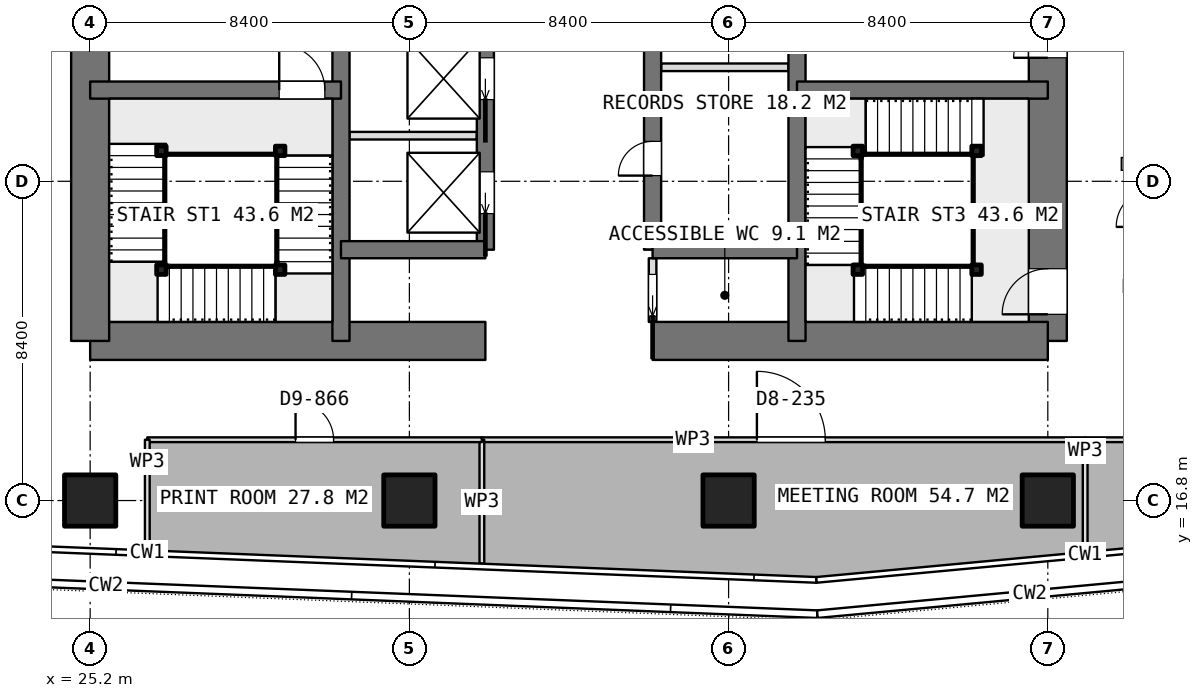
"""IFC4 building model, lengths in metres.
Left out: names, types, materials, properties, quantities, classifications, styles, units other than length and angle.
Written with IfcOpenShell. Run it as: python <this file> out.ifc"""

import sys

from ifc_helpers import new_model, si_unit, direction, frame, frame_2d, origin, origin_2d, place, context, subcontext, project, spatial, rectangle, extrude, element, fill, save


model = new_model("IFC4")
c1 = context("Model", 3, precision=1e-05, world=origin(), true_north=direction((0.0, 1.0)))
c2 = subcontext(c1, "Body", "Model", "MODEL_VIEW")
j1 = project(units=[si_unit("LENGTHUNIT", "METRE"), si_unit("PLANEANGLEUNIT", "RADIAN")], contexts=[c1])
p1 = place(None, origin())
s1 = spatial("IfcSite", under=j1, at=p1, CompositionType="ELEMENT")
p2 = place(p1, origin())
s2 = spatial("IfcBuilding", under=s1, at=p2, CompositionType="ELEMENT")
p3 = place(p2, frame((0.0, 0.0, 217.7)))
s3 = spatial("IfcBuildingStorey", under=s2, at=p3, CompositionType="ELEMENT", Elevation=217.7)
p4 = place(p3, frame((25.2, 21.0, 0.0), z_axis=(0.0, 0.0, 1.0), x_axis=(1.0, 0.0, 0.0)))
e1 = element("IfcWall", 1, at=p4, inside=s3, PredefinedType="SHEAR", context=c2, shape_type="SweptSolid", body=[
    extrude(rectangle(XDim=10.4, YDim=1.0, at=frame_2d((5.2, 0.0))), origin(), (0.0, 0.0, 1.0), 3.75),
])
p5 = place(p3, frame((40.0, 21.0, 0.0), z_axis=(0.0, 0.0, 1.0), x_axis=(1.0, 0.0, 0.0)))
e2 = element("IfcWall", 2, at=p5, inside=s3, PredefinedType="SHEAR", context=c2, shape_type="SweptSolid", body=[
    extrude(rectangle(XDim=10.4, YDim=1.0, at=frame_2d((5.2, 0.0))), origin(), (0.0, 0.0, 1.0), 3.75),
])
p6 = place(p3, frame((25.2, 21.0, 0.0), z_axis=(0.0, 0.0, 1.0), x_axis=(0.0, 1.0, 0.0)))
e3 = element("IfcWall", 3, at=p6, inside=s3, PredefinedType="SHEAR", context=c2, shape_type="SweptSolid", body=[
    extrude(rectangle(XDim=25.2, YDim=1.0, at=frame_2d((12.6, 0.0))), origin(), (0.0, 0.0, 1.0), 3.75),
])
p7 = place(p6, frame((7.8, 0.0, 0.0)))
e4 = element("IfcOpeningElement", 4, at=p7, cuts=e3, PredefinedType="OPENING", context=c2, shape_type="SweptSolid", body=[
    extrude(rectangle(XDim=1.2, YDim=2.1, at=frame_2d((0.6, 1.05))), frame((0.0, 0.51, 0.0), z_axis=(0.0, -1.0, 0.0), x_axis=(1.0, 0.0, 0.0)), (0.0, 0.0, 1.0), 1.02),
])
p8 = place(p6, frame((14.25, 0.0, 0.0)))
e5 = element("IfcOpeningElement", 5, at=p8, cuts=e3, PredefinedType="OPENING", context=c2, shape_type="SweptSolid", body=[
    extrude(rectangle(XDim=0.9, YDim=2.1, at=frame_2d((0.45, 1.05))), frame((0.0, 0.51, 0.0), z_axis=(0.0, -1.0, 0.0), x_axis=(1.0, 0.0, 0.0)), (0.0, 0.0, 1.0), 1.02),
])
p9 = place(p6, frame((16.85, 0.0, 0.0)))
e6 = element("IfcOpeningElement", 6, at=p9, cuts=e3, PredefinedType="OPENING", context=c2, shape_type="SweptSolid", body=[
    extrude(rectangle(XDim=0.9, YDim=2.1, at=frame_2d((0.45, 1.05))), frame((0.0, 0.51, 0.0), z_axis=(0.0, -1.0, 0.0), x_axis=(1.0, 0.0, 0.0)), (0.0, 0.0, 1.0), 1.02),
])
p10 = place(p6, frame((19.025, 0.0, 0.0)))
e7 = element("IfcOpeningElement", 7, at=p10, cuts=e3, PredefinedType="OPENING", context=c2, shape_type="SweptSolid", body=[
    extrude(rectangle(XDim=1.2, YDim=2.1, at=frame_2d((0.6, 1.05))), frame((0.0, 0.51, 0.0), z_axis=(0.0, -1.0, 0.0), x_axis=(1.0, 0.0, 0.0)), (0.0, 0.0, 1.0), 1.02),
])
p11 = place(p3, frame((50.4, 21.0, 0.0), z_axis=(0.0, 0.0, 1.0), x_axis=(0.0, 1.0, 0.0)))
e8 = element("IfcWall", 8, at=p11, inside=s3, PredefinedType="SHEAR", context=c2, shape_type="SweptSolid", body=[
    extrude(rectangle(XDim=25.2, YDim=1.0, at=frame_2d((12.6, 0.0))), origin(), (0.0, 0.0, 1.0), 3.75),
])
p12 = place(p11, frame((16.2, 0.0, 0.0)))
e9 = element("IfcOpeningElement", 9, at=p12, cuts=e8, PredefinedType="OPENING", context=c2, shape_type="SweptSolid", body=[
    extrude(rectangle(XDim=1.2, YDim=2.1, at=frame_2d((0.6, 1.05))), frame((0.0, 0.51, 0.0), z_axis=(0.0, -1.0, 0.0), x_axis=(1.0, 0.0, 0.0)), (0.0, 0.0, 1.0), 1.02),
])
p13 = place(p11, frame((10.05, 0.0, 0.0)))
e10 = element("IfcOpeningElement", 10, at=p13, cuts=e8, PredefinedType="OPENING", context=c2, shape_type="SweptSolid", body=[
    extrude(rectangle(XDim=0.9, YDim=2.1, at=frame_2d((0.45, 1.05))), frame((0.0, 0.51, 0.0), z_axis=(0.0, -1.0, 0.0), x_axis=(1.0, 0.0, 0.0)), (0.0, 0.0, 1.0), 1.02),
])
p14 = place(p11, frame((7.45, 0.0, 0.0)))
e11 = element("IfcOpeningElement", 11, at=p14, cuts=e8, PredefinedType="OPENING", context=c2, shape_type="SweptSolid", body=[
    extrude(rectangle(XDim=0.9, YDim=2.1, at=frame_2d((0.45, 1.05))), frame((0.0, 0.51, 0.0), z_axis=(0.0, -1.0, 0.0), x_axis=(1.0, 0.0, 0.0)), (0.0, 0.0, 1.0), 1.02),
])
p15 = place(p11, frame((0.7, 0.0, 0.0)))
e12 = element("IfcOpeningElement", 12, at=p15, cuts=e8, PredefinedType="OPENING", context=c2, shape_type="SweptSolid", body=[
    extrude(rectangle(XDim=1.2, YDim=2.1, at=frame_2d((0.6, 1.05))), frame((0.0, 0.51, 0.0), z_axis=(0.0, -1.0, 0.0), x_axis=(1.0, 0.0, 0.0)), (0.0, 0.0, 1.0), 1.02),
])
for number, where, z_axis, x_axis in (
    (13, (31.8, 21.0, 0.0), (0.0, 0.0, 1.0), (0.0, 1.0, 0.0)),
    (14, (43.8, 21.0, 0.0), (0.0, 0.0, 1.0), (0.0, 1.0, 0.0)),
):
    element("IfcWall", number, at=place(p3, frame(where, z_axis=z_axis, x_axis=x_axis)), inside=s3, PredefinedType="SHEAR", context=c2, shape_type="SweptSolid", body=[
        extrude(rectangle(XDim=25.2, YDim=0.45, at=frame_2d((12.6, 0.0))), origin(), (0.0, 0.0, 1.0), 3.75),
    ])
p16 = place(p3, frame((35.6, 23.4, 0.0), z_axis=(0.0, 0.0, 1.0), x_axis=(0.0, 1.0, 0.0)))
e15 = element("IfcWall", 15, at=p16, inside=s3, PredefinedType="SHEAR", context=c2, shape_type="SweptSolid", body=[
    extrude(rectangle(XDim=18.0, YDim=0.45, at=frame_2d((9.0, 0.0))), origin(), (0.0, 0.0, 1.0), 3.75),
])
p17 = place(p16, frame((0.95, 0.0, 0.0)))
e16 = element("IfcOpeningElement", 16, at=p17, cuts=e15, PredefinedType="OPENING", context=c2, shape_type="SweptSolid", body=[
    extrude(rectangle(XDim=1.1, YDim=2.1, at=frame_2d((0.55, 1.05))), frame((0.0, 0.235, 0.0), z_axis=(0.0, -1.0, 0.0), x_axis=(1.0, 0.0, 0.0)), (0.0, 0.0, 1.0), 0.47),
])
p18 = place(p16, frame((3.95, 0.0, 0.0)))
e17 = element("IfcOpeningElement", 17, at=p18, cuts=e15, PredefinedType="OPENING", context=c2, shape_type="SweptSolid", body=[
    extrude(rectangle(XDim=1.1, YDim=2.1, at=frame_2d((0.55, 1.05))), frame((0.0, 0.235, 0.0), z_axis=(0.0, -1.0, 0.0), x_axis=(1.0, 0.0, 0.0)), (0.0, 0.0, 1.0), 0.47),
])
p19 = place(p16, frame((6.95, 0.0, 0.0)))
e18 = element("IfcOpeningElement", 18, at=p19, cuts=e15, PredefinedType="OPENING", context=c2, shape_type="SweptSolid", body=[
    extrude(rectangle(XDim=1.1, YDim=2.1, at=frame_2d((0.55, 1.05))), frame((0.0, 0.235, 0.0), z_axis=(0.0, -1.0, 0.0), x_axis=(1.0, 0.0, 0.0)), (0.0, 0.0, 1.0), 0.47),
])
p20 = place(p16, frame((9.95, 0.0, 0.0)))
e19 = element("IfcOpeningElement", 19, at=p20, cuts=e15, PredefinedType="OPENING", context=c2, shape_type="SweptSolid", body=[
    extrude(rectangle(XDim=1.1, YDim=2.1, at=frame_2d((0.55, 1.05))), frame((0.0, 0.235, 0.0), z_axis=(0.0, -1.0, 0.0), x_axis=(1.0, 0.0, 0.0)), (0.0, 0.0, 1.0), 0.47),
])
p21 = place(p16, frame((12.95, 0.0, 0.0)))
e20 = element("IfcOpeningElement", 20, at=p21, cuts=e15, PredefinedType="OPENING", context=c2, shape_type="SweptSolid", body=[
    extrude(rectangle(XDim=1.1, YDim=2.1, at=frame_2d((0.55, 1.05))), frame((0.0, 0.235, 0.0), z_axis=(0.0, -1.0, 0.0), x_axis=(1.0, 0.0, 0.0)), (0.0, 0.0, 1.0), 0.47),
])
p22 = place(p16, frame((15.95, 0.0, 0.0)))
e21 = element("IfcOpeningElement", 21, at=p22, cuts=e15, PredefinedType="OPENING", context=c2, shape_type="SweptSolid", body=[
    extrude(rectangle(XDim=1.1, YDim=2.1, at=frame_2d((0.55, 1.05))), frame((0.0, 0.235, 0.0), z_axis=(0.0, -1.0, 0.0), x_axis=(1.0, 0.0, 0.0)), (0.0, 0.0, 1.0), 0.47),
])
p23 = place(p3, frame((40.0, 23.4, 0.0), z_axis=(0.0, 0.0, 1.0), x_axis=(0.0, 1.0, 0.0)))
e22 = element("IfcWall", 22, at=p23, inside=s3, PredefinedType="SHEAR", context=c2, shape_type="SweptSolid", body=[
    extrude(rectangle(XDim=18.0, YDim=0.45, at=frame_2d((9.0, 0.0))), origin(), (0.0, 0.0, 1.0), 3.75),
])
p24 = place(p23, frame((1.95, 0.0, 0.0)))
e23 = element("IfcOpeningElement", 23, at=p24, cuts=e22, PredefinedType="OPENING", context=c2, shape_type="SweptSolid", body=[
    extrude(rectangle(XDim=0.9, YDim=2.1, at=frame_2d((0.45, 1.05))), frame((0.0, 0.235, 0.0), z_axis=(0.0, -1.0, 0.0), x_axis=(1.0, 0.0, 0.0)), (0.0, 0.0, 1.0), 0.47),
])
p25 = place(p23, frame((7.95, 0.0, 0.0)))
e24 = element("IfcOpeningElement", 24, at=p25, cuts=e22, PredefinedType="OPENING", context=c2, shape_type="SweptSolid", body=[
    extrude(rectangle(XDim=0.9, YDim=2.1, at=frame_2d((0.45, 1.05))), frame((0.0, 0.235, 0.0), z_axis=(0.0, -1.0, 0.0), x_axis=(1.0, 0.0, 0.0)), (0.0, 0.0, 1.0), 0.47),
])
for number, where, z_axis, x_axis in (
    (25, (31.8, 23.4, 0.0), (0.0, 0.0, 1.0), (1.0, 0.0, 0.0)),
    (26, (40.0, 23.4, 0.0), (0.0, 0.0, 1.0), (1.0, 0.0, 0.0)),
):
    element("IfcWall", number, at=place(p3, frame(where, z_axis=z_axis, x_axis=x_axis)), inside=s3, PredefinedType="SHEAR", context=c2, shape_type="SweptSolid", body=[
        extrude(rectangle(XDim=3.8, YDim=0.45, at=frame_2d((1.9, 0.0))), origin(), (0.0, 0.0, 1.0), 3.75),
    ])
p26 = place(p3, frame((25.2, 27.6, 0.0), z_axis=(0.0, 0.0, 1.0), x_axis=(1.0, 0.0, 0.0)))
e27 = element("IfcWall", 27, at=p26, inside=s3, PredefinedType="SHEAR", context=c2, shape_type="SweptSolid", body=[
    extrude(rectangle(XDim=6.6, YDim=0.45, at=frame_2d((3.3, 0.0))), origin(), (0.0, 0.0, 1.0), 3.75),
])
p27 = place(p26, frame((4.975, 0.0, 0.0)))
e28 = element("IfcOpeningElement", 28, at=p27, cuts=e27, PredefinedType="OPENING", context=c2, shape_type="SweptSolid", body=[
    extrude(rectangle(XDim=1.2, YDim=2.1, at=frame_2d((0.6, 1.05))), frame((0.0, 0.235, 0.0), z_axis=(0.0, -1.0, 0.0), x_axis=(1.0, 0.0, 0.0)), (0.0, 0.0, 1.0), 0.47),
])
p28 = place(p3, frame((43.8, 27.6, 0.0), z_axis=(0.0, 0.0, 1.0), x_axis=(1.0, 0.0, 0.0)))
e29 = element("IfcWall", 29, at=p28, inside=s3, PredefinedType="SHEAR", context=c2, shape_type="SweptSolid", body=[
    extrude(rectangle(XDim=6.6, YDim=0.45, at=frame_2d((3.3, 0.0))), origin(), (0.0, 0.0, 1.0), 3.75),
])
for number, where, z_axis, x_axis in (
    (30, (25.2, 16.8, 0.0), (0.0, 0.0, 1.0), (1.0, 0.0, 0.0)),
    (31, (33.6, 16.8, 0.0), (0.0, 0.0, 1.0), (1.0, 0.0, 0.0)),
    (32, (42.0, 16.8, 0.0), (0.0, 0.0, 1.0), (1.0, 0.0, 0.0)),
    (33, (50.4, 16.8, 0.0), (0.0, 0.0, 1.0), (1.0, 0.0, 0.0)),
):
    element("IfcColumn", number, at=place(p3, frame(where, z_axis=z_axis, x_axis=x_axis)), inside=s3, PredefinedType="COLUMN", context=c2, shape_type="SweptSolid", body=[
        extrude(rectangle(XDim=1.35, YDim=1.35, at=origin_2d()), origin(), (0.0, 0.0, 1.0), 3.75),
    ])
p29 = place(p3, frame((32.025, 26.4, 0.0), z_axis=(0.0, 0.0, 1.0), x_axis=(1.0, 0.0, 0.0)))
e34 = element("IfcWall", 34, at=p29, inside=s3, PredefinedType="PARTITIONING", context=c2, shape_type="SweptSolid", body=[
    extrude(rectangle(XDim=3.35, YDim=0.2, at=frame_2d((1.675, 0.0))), origin(), (0.0, 0.0, 1.0), 3.5),
])
p30 = place(p3, frame((40.0, 21.5, 0.0), z_axis=(0.0, 0.0, 1.0), x_axis=(0.0, 1.0, 0.0)))
e35 = element("IfcWall", 35, at=p30, inside=s3, PredefinedType="PARTITIONING", context=c2, shape_type="SweptSolid", body=[
    extrude(rectangle(XDim=1.675, YDim=0.2, at=frame_2d((0.837, 0.0))), origin(), (0.0, 0.0, 1.0), 3.5),
])
p31 = place(p30, frame((0.15, 0.0, 0.0)))
e36 = element("IfcOpeningElement", 36, at=p31, cuts=e35, PredefinedType="OPENING", context=c2, shape_type="SweptSolid", body=[
    extrude(rectangle(XDim=1.1, YDim=2.1, at=frame_2d((0.55, 1.05))), frame((0.0, 0.11, 0.0), z_axis=(0.0, -1.0, 0.0), x_axis=(1.0, 0.0, 0.0)), (0.0, 0.0, 1.0), 0.22),
])
p32 = place(p3, frame((40.225, 28.2, 0.0), z_axis=(0.0, 0.0, 1.0), x_axis=(1.0, 0.0, 0.0)))
e37 = element("IfcWall", 37, at=p32, inside=s3, PredefinedType="PARTITIONING", context=c2, shape_type="SweptSolid", body=[
    extrude(rectangle(XDim=3.35, YDim=0.2, at=frame_2d((1.675, 0.0))), origin(), (0.0, 0.0, 1.0), 3.5),
])
p33 = place(p3, frame((35.508, 18.4, 0.0), z_axis=(0.0, 0.0, 1.0), x_axis=(1.0, 0.0, 0.0)))
e38 = element("IfcWall", 38, at=p33, inside=s3, PredefinedType="PARTITIONING", context=c2, shape_type="SweptSolid", body=[
    extrude(rectangle(XDim=15.875, YDim=0.125, at=frame_2d((7.938, 0.0))), origin(), (0.0, 0.0, 1.0), 3.5),
])
p34 = place(p33, frame((7.237, 0.0, 0.0)))
e39 = element("IfcOpeningElement", 39, at=p34, cuts=e38, PredefinedType="OPENING", context=c2, shape_type="SweptSolid", body=[
    extrude(rectangle(XDim=1.8, YDim=2.1, at=frame_2d((0.9, 1.05))), frame((0.0, 0.073, 0.0), z_axis=(0.0, -1.0, 0.0), x_axis=(1.0, 0.0, 0.0)), (0.0, 0.0, 1.0), 0.145),
])
p35 = place(p3, frame((51.383, 18.4, 0.0), z_axis=(0.0, 0.0, 1.0), x_axis=(0.0, -1.0, 0.0)))
e40 = element("IfcWall", 40, at=p35, inside=s3, PredefinedType="PARTITIONING", context=c2, shape_type="SweptSolid", body=[
    extrude(rectangle(XDim=2.949, YDim=0.125, at=frame_2d((1.475, 0.0))), origin(), (0.0, 0.0, 1.0), 3.5),
])
p36 = place(p3, frame((35.508, 15.143, 0.0), z_axis=(0.0, 0.0, 1.0), x_axis=(0.0, 1.0, 0.0)))
e41 = element("IfcWall", 41, at=p36, inside=s3, PredefinedType="PARTITIONING", context=c2, shape_type="SweptSolid", body=[
    extrude(rectangle(XDim=3.257, YDim=0.125, at=frame_2d((1.628, 0.0))), origin(), (0.0, 0.0, 1.0), 3.5),
])
p37 = place(p3, frame((51.383, 18.4, 0.0), z_axis=(0.0, 0.0, 1.0), x_axis=(1.0, 0.0, 0.0)))
e42 = element("IfcWall", 42, at=p37, inside=s3, PredefinedType="PARTITIONING", context=c2, shape_type="SweptSolid", body=[
    extrude(rectangle(XDim=5.017, YDim=0.125, at=frame_2d((2.508, 0.0))), origin(), (0.0, 0.0, 1.0), 3.5),
])
p38 = place(p37, frame((2.008, 0.0, 0.0)))
e43 = element("IfcOpeningElement", 43, at=p38, cuts=e42, PredefinedType="OPENING", context=c2, shape_type="SweptSolid", body=[
    extrude(rectangle(XDim=1.0, YDim=2.1, at=frame_2d((0.5, 1.05))), frame((0.0, 0.073, 0.0), z_axis=(0.0, -1.0, 0.0), x_axis=(1.0, 0.0, 0.0)), (0.0, 0.0, 1.0), 0.145),
])
p39 = place(p3, frame((26.704, 18.4, 0.0), z_axis=(0.0, 0.0, 1.0), x_axis=(1.0, 0.0, 0.0)))
e44 = element("IfcWall", 44, at=p39, inside=s3, PredefinedType="PARTITIONING", context=c2, shape_type="SweptSolid", body=[
    extrude(rectangle(XDim=8.803, YDim=0.125, at=frame_2d((4.401, 0.0))), origin(), (0.0, 0.0, 1.0), 3.5),
])
p40 = place(p39, frame((3.901, 0.0, 0.0)))
e45 = element("IfcOpeningElement", 45, at=p40, cuts=e44, PredefinedType="OPENING", context=c2, shape_type="SweptSolid", body=[
    extrude(rectangle(XDim=1.0, YDim=2.1, at=frame_2d((0.5, 1.05))), frame((0.0, 0.073, 0.0), z_axis=(0.0, -1.0, 0.0), x_axis=(1.0, 0.0, 0.0)), (0.0, 0.0, 1.0), 0.145),
])
p41 = place(p3, frame((26.704, 15.495, 0.0), z_axis=(0.0, 0.0, 1.0), x_axis=(0.0, 1.0, 0.0)))
e46 = element("IfcWall", 46, at=p41, inside=s3, PredefinedType="PARTITIONING", context=c2, shape_type="SweptSolid", body=[
    extrude(rectangle(XDim=2.905, YDim=0.125, at=frame_2d((1.452, 0.0))), origin(), (0.0, 0.0, 1.0), 3.5),
])
for number, where, z_axis, x_axis in (
    (47, (30.2, 26.0, 0.0), (0.0, 0.0, 1.0), (1.0, 0.0, 0.0)),
    (48, (30.2, 22.875, 0.0), (0.0, 0.0, 1.0), (1.0, 0.0, 0.0)),
    (49, (27.075, 22.875, 0.0), (0.0, 0.0, 1.0), (1.0, 0.0, 0.0)),
    (50, (27.075, 26.0, 0.0), (0.0, 0.0, 1.0), (1.0, 0.0, 0.0)),
    (51, (48.525, 22.875, 0.0), (0.0, 0.0, 1.0), (1.0, 0.0, 0.0)),
    (52, (45.4, 22.875, 0.0), (0.0, 0.0, 1.0), (1.0, 0.0, 0.0)),
    (53, (45.4, 26.0, 0.0), (0.0, 0.0, 1.0), (1.0, 0.0, 0.0)),
    (54, (48.525, 26.0, 0.0), (0.0, 0.0, 1.0), (1.0, 0.0, 0.0)),
):
    element("IfcColumn", number, at=place(p3, frame(where, z_axis=z_axis, x_axis=x_axis)), inside=s3, PredefinedType="COLUMN", context=c2, shape_type="SweptSolid", body=[
        extrude(rectangle(XDim=0.25, YDim=0.25, at=origin_2d()), origin(), (0.0, 0.0, 1.0), 3.75),
    ])
p42 = place(p14, origin())
e55 = element("IfcDoor", 55, at=p42, inside=s3, OperationType="SINGLE_SWING_LEFT", PredefinedType="DOOR", context=c2, shape_type="SweptSolid", body=[
    extrude(rectangle(XDim=0.9, YDim=2.1, at=frame_2d((0.45, 1.05))), frame((0.0, 0.025, 0.0), z_axis=(0.0, -1.0, 0.0), x_axis=(1.0, 0.0, 0.0)), (0.0, 0.0, 1.0), 0.05),
])
fill(e11, e55)
p43 = place(p31, origin())
e56 = element("IfcDoor", 56, at=p43, inside=s3, OperationType="SLIDING_TO_LEFT", PredefinedType="DOOR", context=c2, shape_type="SweptSolid", body=[
    extrude(rectangle(XDim=1.1, YDim=2.1, at=frame_2d((0.55, 1.05))), frame((0.0, 0.025, 0.0), z_axis=(0.0, -1.0, 0.0), x_axis=(1.0, 0.0, 0.0)), (0.0, 0.0, 1.0), 0.05),
])
fill(e36, e56)
p44 = place(p24, origin())
e57 = element("IfcDoor", 57, at=p44, inside=s3, OperationType="SINGLE_SWING_LEFT", PredefinedType="DOOR", context=c2, shape_type="SweptSolid", body=[
    extrude(rectangle(XDim=0.9, YDim=2.1, at=frame_2d((0.45, 1.05))), frame((0.0, 0.025, 0.0), z_axis=(0.0, -1.0, 0.0), x_axis=(1.0, 0.0, 0.0)), (0.0, 0.0, 1.0), 0.05),
])
fill(e23, e57)
p45 = place(p17, origin())
e58 = element("IfcDoor", 58, at=p45, inside=s3, OperationType="SLIDING_TO_LEFT", PredefinedType="USERDEFINED", context=c2, shape_type="SweptSolid", body=[
    extrude(rectangle(XDim=1.1, YDim=2.1, at=frame_2d((0.55, 1.05))), frame((0.0, 0.025, 0.0), z_axis=(0.0, -1.0, 0.0), x_axis=(1.0, 0.0, 0.0)), (0.0, 0.0, 1.0), 0.05),
])
fill(e16, e58)
p46 = place(p18, origin())
e59 = element("IfcDoor", 59, at=p46, inside=s3, OperationType="SLIDING_TO_LEFT", PredefinedType="USERDEFINED", context=c2, shape_type="SweptSolid", body=[
    extrude(rectangle(XDim=1.1, YDim=2.1, at=frame_2d((0.55, 1.05))), frame((0.0, 0.025, 0.0), z_axis=(0.0, -1.0, 0.0), x_axis=(1.0, 0.0, 0.0)), (0.0, 0.0, 1.0), 0.05),
])
fill(e17, e59)
p47 = place(p34, origin())
e60 = element("IfcDoor", 60, at=p47, inside=s3, OperationType="DOUBLE_DOOR_SINGLE_SWING", PredefinedType="DOOR", context=c2, shape_type="SweptSolid", body=[
    extrude(rectangle(XDim=1.8, YDim=2.1, at=frame_2d((0.9, 1.05))), frame((0.0, 0.025, 0.0), z_axis=(0.0, -1.0, 0.0), x_axis=(1.0, 0.0, 0.0)), (0.0, 0.0, 1.0), 0.05),
])
fill(e39, e60)
p48 = place(p40, origin())
e61 = element("IfcDoor", 61, at=p48, inside=s3, OperationType="SINGLE_SWING_LEFT", PredefinedType="DOOR", context=c2, shape_type="SweptSolid", body=[
    extrude(rectangle(XDim=1.0, YDim=2.1, at=frame_2d((0.5, 1.05))), frame((0.0, 0.025, 0.0), z_axis=(0.0, -1.0, 0.0), x_axis=(1.0, 0.0, 0.0)), (0.0, 0.0, 1.0), 0.05),
])
fill(e45, e61)
p49 = place(p27, origin())
e62 = element("IfcDoor", 62, at=p49, inside=s3, OperationType="SINGLE_SWING_RIGHT", PredefinedType="DOOR", context=c2, shape_type="SweptSolid", body=[
    extrude(rectangle(XDim=1.2, YDim=2.1, at=frame_2d((0.6, 1.05))), frame((0.0, 0.025, 0.0), z_axis=(0.0, -1.0, 0.0), x_axis=(1.0, 0.0, 0.0)), (0.0, 0.0, 1.0), 0.05),
])
fill(e28, e62)
p50 = place(p15, origin())
e63 = element("IfcDoor", 63, at=p50, inside=s3, OperationType="SINGLE_SWING_RIGHT", PredefinedType="DOOR", context=c2, shape_type="SweptSolid", body=[
    extrude(rectangle(XDim=1.2, YDim=2.1, at=frame_2d((0.6, 1.05))), frame((0.0, 0.025, 0.0), z_axis=(0.0, -1.0, 0.0), x_axis=(1.0, 0.0, 0.0)), (0.0, 0.0, 1.0), 0.05),
])
fill(e12, e63)
save(model, sys.argv[1])
